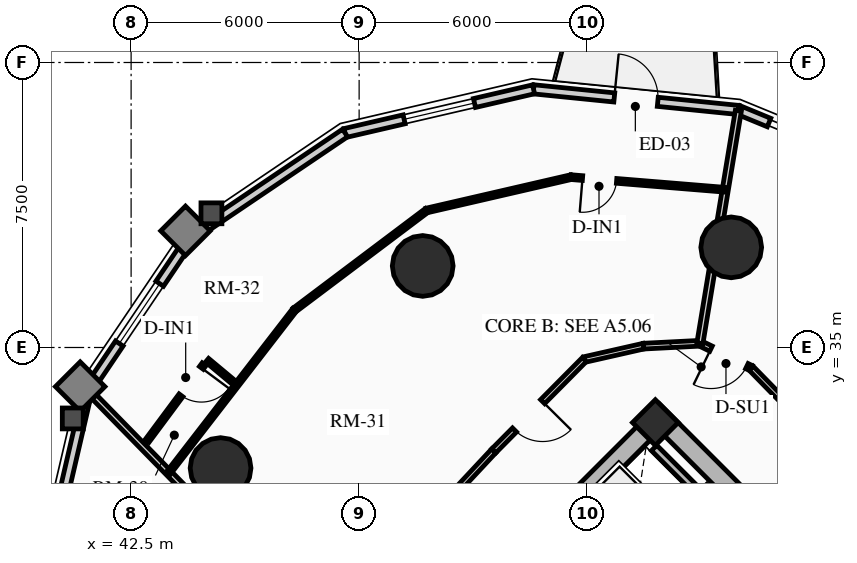
"""IFC4 building model, lengths in metres.
Left out: names, types, materials, properties, quantities, classifications, styles, units other than length and angle.
Written with IfcOpenShell. Run it as: python <this file> out.ifc"""

import sys

from ifc_helpers import new_model, si_unit, direction, frame, frame_2d, origin, origin_2d, place, context, subcontext, project, spatial, rectangle, circle, extrude, source, transform, mapped, element, fill, save


model = new_model("IFC4")
c1 = context("Model", 3, precision=1e-05, world=origin(), true_north=direction((0.0, 1.0)))
c2 = subcontext(c1, "Body", "Model", "MODEL_VIEW")
j1 = project(units=[si_unit("LENGTHUNIT", "METRE"), si_unit("PLANEANGLEUNIT", "RADIAN")], contexts=[c1])
p1 = place(None, origin())
s1 = spatial("IfcSite", under=j1, at=p1, CompositionType="ELEMENT")
p2 = place(p1, origin())
s2 = spatial("IfcBuilding", under=s1, at=p2, CompositionType="ELEMENT")
p3 = place(p2, frame((0.0, 0.0, 39.46)))
s3 = spatial("IfcBuildingStorey", under=s2, at=p3, CompositionType="ELEMENT", Elevation=39.46)
p4 = place(p3, frame((66.339, 23.227, 0.0), z_axis=(0.0, 0.0, 1.0), x_axis=(-0.707106781187, 0.707106781187, 0.0)))
e1 = element("IfcWall", 1, at=p4, inside=s3, PredefinedType="SHEAR", context=c2, shape_type="SweptSolid", body=[
    extrude(rectangle(XDim=14.3, YDim=0.5, at=frame_2d((7.15, 0.0))), origin(), (0.0, 0.0, 1.0), 2.91),
])
p5 = place(p3, frame((48.838, 25.596, 0.0), z_axis=(0.0, 0.0, 1.0), x_axis=(0.707106781187, 0.707106781187, 0.0)))
e2 = element("IfcWall", 2, at=p5, inside=s3, PredefinedType="SHEAR", context=c2, shape_type="SweptSolid", body=[
    extrude(rectangle(XDim=10.7, YDim=0.5, at=frame_2d((5.35, 0.0))), origin(), (0.0, 0.0, 1.0), 2.91),
])
m1 = source(origin(), c2, "Body", "SweptSolid", [
    extrude(rectangle(XDim=1.5, YDim=2.02, at=frame_2d((0.75, 1.01))), frame((0.0, 0.26, 0.0), z_axis=(0.0, -1.0, 0.0), x_axis=(1.0, 0.0, 0.0)), (0.0, 0.0, 1.0), 0.52),
])
p6 = place(p5, frame((4.6, 0.0, 0.0)))
e3 = element("IfcOpeningElement", 3, at=p6, cuts=e2, PredefinedType="OPENING", context=c2, shape_type="MappedRepresentation", body=[
    mapped(m1, transform((0.0, 0.0, 0.0), x_axis=(1.0, 0.0, 0.0), y_axis=(0.0, 1.0, 0.0), z_axis=(0.0, 0.0, 1.0), scale=1.0)),
])
p7 = place(p3, frame((56.294, 33.024, 0.0), z_axis=(0.0, 0.0, 1.0), x_axis=(0.707106781187, 0.707106781187, 0.0)))
e4 = element("IfcColumn", 4, at=p7, inside=s3, PredefinedType="COLUMN", context=c2, shape_type="SweptSolid", body=[
    extrude(rectangle(XDim=0.85, YDim=0.85, at=origin_2d()), origin(), (0.0, 0.0, 1.0), 2.91),
])
for number, where, z_axis, x_axis in (
    (5, (58.291, 37.635, 0.0), (0.0, 0.0, 1.0), (1.0, 0.0, 0.0)),
    (6, (50.173, 37.146, 0.0), (0.0, 0.0, 1.0), (1.0, 0.0, 0.0)),
    (7, (44.854, 31.827, 0.0), (0.0, 0.0, 1.0), (1.0, 0.0, 0.0)),
):
    element("IfcColumn", number, at=place(p3, frame(where, z_axis=z_axis, x_axis=x_axis)), inside=s3, PredefinedType="USERDEFINED", context=c2, shape_type="SweptSolid", body=[
        extrude(circle(Radius=0.8, at=origin_2d()), origin(), (0.0, 0.0, 1.0), 2.91),
    ])
p8 = place(p3, frame((58.482, 41.251, 0.0), z_axis=(0.0, 0.0, 1.0), x_axis=(0.924556017656, -0.381046152345, 0.0)))
e8 = element("IfcWall", 8, at=p8, inside=s3, PredefinedType="SOLIDWALL", context=c2, shape_type="SweptSolid", body=[
    extrude(rectangle(XDim=0.87, YDim=0.24, at=frame_2d((0.435, 0.0))), origin(), (0.0, 0.0, 1.0), 2.073),
])
p9 = place(p3, frame((53.09, 41.794, 0.0), z_axis=(0.0, 0.0, 1.0), x_axis=(0.994968263437, -0.100190592135, 0.0)))
e9 = element("IfcWall", 9, at=p9, inside=s3, PredefinedType="SOLIDWALL", context=c2, shape_type="SweptSolid", body=[
    extrude(rectangle(XDim=5.419, YDim=0.24, at=frame_2d((2.71, 0.0))), origin(), (0.0, 0.0, 1.0), 2.073),
])
m2 = source(origin(), c2, "Body", "SweptSolid", [
    extrude(rectangle(XDim=1.15, YDim=2.005, at=frame_2d((0.575, 1.002))), frame((0.0, 0.13, 0.0), z_axis=(0.0, -1.0, 0.0), x_axis=(1.0, 0.0, 0.0)), (0.0, 0.0, 1.0), 0.26),
])
p10 = place(p9, frame((2.135, 0.0, 0.0)))
e10 = element("IfcOpeningElement", 10, at=p10, cuts=e9, PredefinedType="OPENING", context=c2, shape_type="MappedRepresentation", body=[
    mapped(m2, transform((0.0, 0.0, 0.0), x_axis=(1.0, 0.0, 0.0), y_axis=(0.0, 1.0, 0.0), z_axis=(0.0, 0.0, 1.0), scale=1.0)),
])
p11 = place(p3, frame((48.129, 40.644, 0.0), z_axis=(0.0, 0.0, 1.0), x_axis=(0.974167686491, 0.22582585901, 0.0)))
e11 = element("IfcWall", 11, at=p11, inside=s3, PredefinedType="SOLIDWALL", context=c2, shape_type="SweptSolid", body=[
    extrude(rectangle(XDim=5.092, YDim=0.24, at=frame_2d((2.546, 0.0))), origin(), (0.0, 0.0, 1.0), 2.073),
])
m3 = source(origin(), c2, "Body", "SweptSolid", [
    extrude(rectangle(XDim=1.9, YDim=1.35, at=frame_2d((0.95, 0.675))), frame((0.0, 0.13, 0.0), z_axis=(0.0, -1.0, 0.0), x_axis=(1.0, 0.0, 0.0)), (0.0, 0.0, 1.0), 0.26),
])
p12 = place(p11, frame((1.596, 0.0, 0.65)))
e12 = element("IfcOpeningElement", 12, at=p12, cuts=e11, PredefinedType="OPENING", context=c2, shape_type="MappedRepresentation", body=[
    mapped(m3, transform((0.0, 0.0, 0.0), x_axis=(1.0, 0.0, 0.0), y_axis=(0.0, 1.0, 0.0), z_axis=(0.0, 0.0, 1.0), scale=1.0)),
])
p13 = place(p3, frame((44.086, 37.914, 0.0), z_axis=(0.0, 0.0, 1.0), x_axis=(0.828748297084, 0.559621532896, 0.0)))
e13 = element("IfcWall", 13, at=p13, inside=s3, PredefinedType="SOLIDWALL", context=c2, shape_type="SweptSolid", body=[
    extrude(rectangle(XDim=4.879, YDim=0.24, at=frame_2d((2.439, 0.0))), origin(), (0.0, 0.0, 1.0), 2.073),
])
p14 = place(p3, frame((41.356, 33.871, 0.0), z_axis=(0.0, 0.0, 1.0), x_axis=(0.559621532896, 0.828748297084, 0.0)))
e14 = element("IfcWall", 14, at=p14, inside=s3, PredefinedType="SOLIDWALL", context=c2, shape_type="SweptSolid", body=[
    extrude(rectangle(XDim=4.879, YDim=0.24, at=frame_2d((2.439, 0.0))), origin(), (0.0, 0.0, 1.0), 2.073),
])
p15 = place(p14, frame((1.489, 0.0, 0.65)))
e15 = element("IfcOpeningElement", 15, at=p15, cuts=e14, PredefinedType="OPENING", context=c2, shape_type="MappedRepresentation", body=[
    mapped(m3, transform((0.0, 0.0, 0.0), x_axis=(1.0, 0.0, 0.0), y_axis=(0.0, 1.0, 0.0), z_axis=(0.0, 0.0, 1.0), scale=1.0)),
])
p16 = place(p3, frame((40.206, 28.91, 0.0), z_axis=(0.0, 0.0, 1.0), x_axis=(0.22582585901, 0.974167686491, 0.0)))
e16 = element("IfcWall", 16, at=p16, inside=s3, PredefinedType="SOLIDWALL", context=c2, shape_type="SweptSolid", body=[
    extrude(rectangle(XDim=5.092, YDim=0.24, at=frame_2d((2.546, 0.0))), origin(), (0.0, 0.0, 1.0), 2.073),
])
p17 = place(p3, frame((57.419, 31.2, 0.0), z_axis=(0.0, 0.0, 1.0), x_axis=(-0.707032117043, 0.707181437447, 0.0)))
e17 = element("IfcWall", 17, at=p17, inside=s3, PredefinedType="SHEAR", context=c2, shape_type="SweptSolid", body=[
    extrude(rectangle(XDim=1.635, YDim=0.2, at=frame_2d((0.817, 0.0))), origin(), (0.0, 0.0, 1.0), 2.91),
])
p18 = place(p3, frame((63.086, 30.086, 0.0), z_axis=(0.0, 0.0, 1.0), x_axis=(-0.699075897379, 0.715047473741, 0.0)))
e18 = element("IfcWall", 18, at=p18, inside=s3, PredefinedType="PARTITIONING", context=c2, shape_type="SweptSolid", body=[
    extrude(rectangle(XDim=6.114, YDim=0.15, at=frame_2d((3.057, 0.0))), origin(), (0.0, 0.0, 1.0), 2.159),
])
p19 = place(p3, frame((58.812, 34.458, 0.0), z_axis=(0.0, 0.0, 1.0), x_axis=(-0.899559490277, 0.436798264021, 0.0)))
e19 = element("IfcWall", 19, at=p19, inside=s3, PredefinedType="PARTITIONING", context=c2, shape_type="SweptSolid", body=[
    extrude(rectangle(XDim=1.495, YDim=0.15, at=frame_2d((0.748, 0.0))), origin(), (0.0, 0.0, 1.0), 2.205),
])
m4 = source(origin(), c2, "Body", "SweptSolid", [
    extrude(rectangle(XDim=1.05, YDim=2.015, at=frame_2d((0.525, 1.007))), frame((0.0, 0.085, 0.0), z_axis=(0.0, -1.0, 0.0), x_axis=(1.0, 0.0, 0.0)), (0.0, 0.0, 1.0), 0.17),
])
p20 = place(p19, frame((0.12, 0.0, 0.0)))
e20 = element("IfcOpeningElement", 20, at=p20, cuts=e19, PredefinedType="OPENING", context=c2, shape_type="MappedRepresentation", body=[
    mapped(m4, transform((0.0, 0.0, 0.0), x_axis=(1.0, 0.0, 0.0), y_axis=(0.0, 1.0, 0.0), z_axis=(0.0, 0.0, 1.0), scale=1.0)),
])
p21 = place(p3, frame((57.467, 35.111, 0.0), z_axis=(0.0, 0.0, 1.0), x_axis=(-0.998691757323, -0.051134859488, 0.0)))
e21 = element("IfcWall", 21, at=p21, inside=s3, PredefinedType="PARTITIONING", context=c2, shape_type="SweptSolid", body=[
    extrude(rectangle(XDim=1.485, YDim=0.15, at=frame_2d((0.742, 0.0))), origin(), (0.0, 0.0, 1.0), 2.159),
])
p22 = place(p3, frame((55.984, 35.035, 0.0), z_axis=(0.0, 0.0, 1.0), x_axis=(-0.975290305708, -0.22092718165, 0.0)))
e22 = element("IfcWall", 22, at=p22, inside=s3, PredefinedType="PARTITIONING", context=c2, shape_type="SweptSolid", body=[
    extrude(rectangle(XDim=1.597, YDim=0.15, at=frame_2d((0.798, 0.0))), origin(), (0.0, 0.0, 1.0), 2.205),
])
p23 = place(p3, frame((54.427, 34.683, 0.0), z_axis=(0.0, 0.0, 1.0), x_axis=(-0.704178989986, -0.710022499687, 0.0)))
e23 = element("IfcWall", 23, at=p23, inside=s3, PredefinedType="PARTITIONING", context=c2, shape_type="SweptSolid", body=[
    extrude(rectangle(XDim=3.384, YDim=0.15, at=frame_2d((1.692, 0.0))), origin(), (0.0, 0.0, 1.0), 2.159),
])
p24 = place(p23, frame((1.56, 0.0, 0.0)))
e24 = element("IfcOpeningElement", 24, at=p24, cuts=e23, PredefinedType="OPENING", context=c2, shape_type="MappedRepresentation", body=[
    mapped(m4, transform((0.0, 0.0, 0.0), x_axis=(1.0, 0.0, 0.0), y_axis=(0.0, 1.0, 0.0), z_axis=(0.0, 0.0, 1.0), scale=1.0)),
])
p25 = place(p3, frame((52.043, 32.28, 0.0), z_axis=(0.0, 0.0, 1.0), x_axis=(-0.682606081633, -0.730786519661, 0.0)))
e25 = element("IfcWall", 25, at=p25, inside=s3, PredefinedType="PARTITIONING", context=c2, shape_type="SweptSolid", body=[
    extrude(rectangle(XDim=6.527, YDim=0.15, at=frame_2d((3.263, 0.0))), origin(), (0.0, 0.0, 1.0), 2.159),
])
p26 = place(p3, frame((57.467, 35.111, 0.0), z_axis=(0.0, 0.0, 1.0), x_axis=(0.163141505202, 0.986602680556, 0.0)))
e26 = element("IfcWall", 26, at=p26, inside=s3, PredefinedType="PARTITIONING", context=c2, shape_type="SweptSolid", body=[
    extrude(rectangle(XDim=6.203, YDim=0.16, at=frame_2d((3.102, 0.0))), origin(), (0.0, 0.0, 1.0), 2.073),
])
p27 = place(p3, frame((47.588, 27.51, 0.0), z_axis=(0.0, 0.0, 1.0), x_axis=(-0.699371977892, 0.714757886657, 0.0)))
e27 = element("IfcWall", 27, at=p27, inside=s3, PredefinedType="PARTITIONING", context=c2, shape_type="SweptSolid", body=[
    extrude(rectangle(XDim=8.886, YDim=0.16, at=frame_2d((4.443, 0.0))), origin(), (0.0, 0.0, 1.0), 2.073),
])
p28 = place(p3, frame((58.135, 39.15, 0.0), z_axis=(0.0, 0.0, 1.0), x_axis=(-0.996661360768, 0.081646383578, 0.0)))
e28 = element("IfcWall", 28, at=p28, inside=s3, PredefinedType="PARTITIONING", context=c2, shape_type="SweptSolid", body=[
    extrude(rectangle(XDim=4.073, YDim=0.125, at=frame_2d((2.036, 0.0))), origin(), (0.0, 0.0, 1.0), 2.635),
])
m5 = source(origin(), c2, "Body", "SweptSolid", [
    extrude(rectangle(XDim=0.9, YDim=2.005, at=frame_2d((0.45, 1.002))), frame((0.0, 0.073, 0.0), z_axis=(0.0, -1.0, 0.0), x_axis=(1.0, 0.0, 0.0)), (0.0, 0.0, 1.0), 0.145),
])
p29 = place(p28, frame((2.869, 0.0, 0.0)))
e29 = element("IfcOpeningElement", 29, at=p29, cuts=e28, PredefinedType="OPENING", context=c2, shape_type="MappedRepresentation", body=[
    mapped(m5, transform((0.0, 0.0, 0.0), x_axis=(1.0, 0.0, 0.0), y_axis=(0.0, 1.0, 0.0), z_axis=(0.0, 0.0, 1.0), scale=1.0)),
])
p30 = place(p3, frame((54.076, 39.483, 0.0), z_axis=(0.0, 0.0, 1.0), x_axis=(-0.974339463782, -0.225083560744, 0.0)))
e30 = element("IfcWall", 30, at=p30, inside=s3, PredefinedType="PARTITIONING", context=c2, shape_type="SweptSolid", body=[
    extrude(rectangle(XDim=3.899, YDim=0.125, at=frame_2d((1.95, 0.0))), origin(), (0.0, 0.0, 1.0), 2.205),
])
p31 = place(p3, frame((50.276, 38.605, 0.0), z_axis=(0.0, 0.0, 1.0), x_axis=(-0.798927876279, -0.60142684385, 0.0)))
e31 = element("IfcWall", 31, at=p31, inside=s3, PredefinedType="PARTITIONING", context=c2, shape_type="SweptSolid", body=[
    extrude(rectangle(XDim=4.35, YDim=0.125, at=frame_2d((2.175, 0.0))), origin(), (0.0, 0.0, 1.0), 2.159),
])
p32 = place(p3, frame((46.801, 35.989, 0.0), z_axis=(0.0, 0.0, 1.0), x_axis=(-0.611635984749, -0.791139319058, 0.0)))
e32 = element("IfcWall", 32, at=p32, inside=s3, PredefinedType="PARTITIONING", context=c2, shape_type="SweptSolid", body=[
    extrude(rectangle(XDim=5.419, YDim=0.125, at=frame_2d((2.709, 0.0))), origin(), (0.0, 0.0, 1.0), 2.159),
])
p33 = place(p3, frame((45.204, 34.078, 0.0), z_axis=(0.0, 0.0, 1.0), x_axis=(-0.768330339969, 0.640053504547, 0.0)))
e33 = element("IfcWall", 33, at=p33, inside=s3, PredefinedType="PARTITIONING", context=c2, shape_type="SweptSolid", body=[
    extrude(rectangle(XDim=0.917, YDim=0.125, at=frame_2d((0.458, 0.0))), origin(), (0.0, 0.0, 1.0), 2.635),
])
p34 = place(p3, frame((44.421, 34.56, 0.0), z_axis=(0.0, 0.0, 1.0), x_axis=(-0.596454407051, -0.802646958699, 0.0)))
e34 = element("IfcWall", 34, at=p34, inside=s3, PredefinedType="PARTITIONING", context=c2, shape_type="SweptSolid", body=[
    extrude(rectangle(XDim=2.516, YDim=0.125, at=frame_2d((1.258, 0.0))), origin(), (0.0, 0.0, 1.0), 2.159),
])
p35 = place(p34, frame((0.12, 0.0, 0.0)))
e35 = element("IfcOpeningElement", 35, at=p35, cuts=e34, PredefinedType="OPENING", context=c2, shape_type="MappedRepresentation", body=[
    mapped(m5, transform((0.0, 0.0, 0.0), x_axis=(1.0, 0.0, 0.0), y_axis=(0.0, 1.0, 0.0), z_axis=(0.0, 0.0, 1.0), scale=1.0)),
])
m6 = source(origin(), c2, "Body", "SweptSolid", [
    extrude(rectangle(XDim=1.15, YDim=2.005, at=frame_2d((0.575, 1.002))), frame((0.0, 0.025, 0.0), z_axis=(0.0, -1.0, 0.0), x_axis=(1.0, 0.0, 0.0)), (0.0, 0.0, 1.0), 0.05),
])
p36 = place(p10, origin())
e36 = element("IfcDoor", 36, at=p36, inside=s3, OperationType="SINGLE_SWING_LEFT", PredefinedType="DOOR", context=c2, shape_type="MappedRepresentation", body=[
    mapped(m6, transform((0.0, 0.0, 0.0), x_axis=(1.0, 0.0, 0.0), y_axis=(0.0, 1.0, 0.0), z_axis=(0.0, 0.0, 1.0), scale=1.0)),
])
fill(e10, e36)
m7 = source(origin(), c2, "Body", "SweptSolid", [
    extrude(rectangle(XDim=1.9, YDim=1.35, at=frame_2d((0.95, 0.675))), frame((0.0, 0.03, 0.0), z_axis=(0.0, -1.0, 0.0), x_axis=(1.0, 0.0, 0.0)), (0.0, 0.0, 1.0), 0.06),
])
p37 = place(p12, origin())
e37 = element("IfcWindow", 37, at=p37, inside=s3, PartitioningType="DOUBLE_PANEL_VERTICAL", PredefinedType="WINDOW", context=c2, shape_type="MappedRepresentation", body=[
    mapped(m7, transform((0.0, 0.0, 0.0), x_axis=(1.0, 0.0, 0.0), y_axis=(0.0, 1.0, 0.0), z_axis=(0.0, 0.0, 1.0), scale=1.0)),
])
fill(e12, e37)
p38 = place(p15, origin())
e38 = element("IfcWindow", 38, at=p38, inside=s3, PartitioningType="DOUBLE_PANEL_VERTICAL", PredefinedType="WINDOW", context=c2, shape_type="MappedRepresentation", body=[
    mapped(m7, transform((0.0, 0.0, 0.0), x_axis=(1.0, 0.0, 0.0), y_axis=(0.0, 1.0, 0.0), z_axis=(0.0, 0.0, 1.0), scale=1.0)),
])
fill(e15, e38)
m8 = source(origin(), c2, "Body", "SweptSolid", [
    extrude(rectangle(XDim=1.05, YDim=2.015, at=frame_2d((0.525, 1.007))), frame((0.0, 0.025, 0.0), z_axis=(0.0, -1.0, 0.0), x_axis=(1.0, 0.0, 0.0)), (0.0, 0.0, 1.0), 0.05),
])
p39 = place(p24, origin())
e39 = element("IfcDoor", 39, at=p39, inside=s3, OperationType="SINGLE_SWING_LEFT", PredefinedType="DOOR", context=c2, shape_type="MappedRepresentation", body=[
    mapped(m8, transform((0.0, 0.0, 0.0), x_axis=(1.0, 0.0, 0.0), y_axis=(0.0, 1.0, 0.0), z_axis=(0.0, 0.0, 1.0), scale=1.0)),
])
fill(e24, e39)
m9 = source(origin(), c2, "Body", "SweptSolid", [
    extrude(rectangle(XDim=0.9, YDim=2.005, at=frame_2d((0.45, 1.002))), frame((0.0, 0.025, 0.0), z_axis=(0.0, -1.0, 0.0), x_axis=(1.0, 0.0, 0.0)), (0.0, 0.0, 1.0), 0.05),
])
p40 = place(p29, origin())
e40 = element("IfcDoor", 40, at=p40, inside=s3, OperationType="SINGLE_SWING_RIGHT", PredefinedType="DOOR", context=c2, shape_type="MappedRepresentation", body=[
    mapped(m9, transform((0.0, 0.0, 0.0), x_axis=(1.0, 0.0, 0.0), y_axis=(0.0, 1.0, 0.0), z_axis=(0.0, 0.0, 1.0), scale=1.0)),
])
fill(e29, e40)
p41 = place(p35, origin())
e41 = element("IfcDoor", 41, at=p41, inside=s3, OperationType="SINGLE_SWING_LEFT", PredefinedType="DOOR", context=c2, shape_type="MappedRepresentation", body=[
    mapped(m9, transform((0.0, 0.0, 0.0), x_axis=(1.0, 0.0, 0.0), y_axis=(0.0, 1.0, 0.0), z_axis=(0.0, 0.0, 1.0), scale=1.0)),
])
fill(e35, e41)
p42 = place(p20, origin())
e42 = element("IfcDoor", 42, at=p42, inside=s3, OperationType="SINGLE_SWING_RIGHT", PredefinedType="DOOR", context=c2, shape_type="MappedRepresentation", body=[
    mapped(m8, transform((0.0, 0.0, 0.0), x_axis=(1.0, 0.0, 0.0), y_axis=(0.0, 1.0, 0.0), z_axis=(0.0, 0.0, 1.0), scale=1.0)),
])
fill(e20, e42)
save(model, sys.argv[1])
